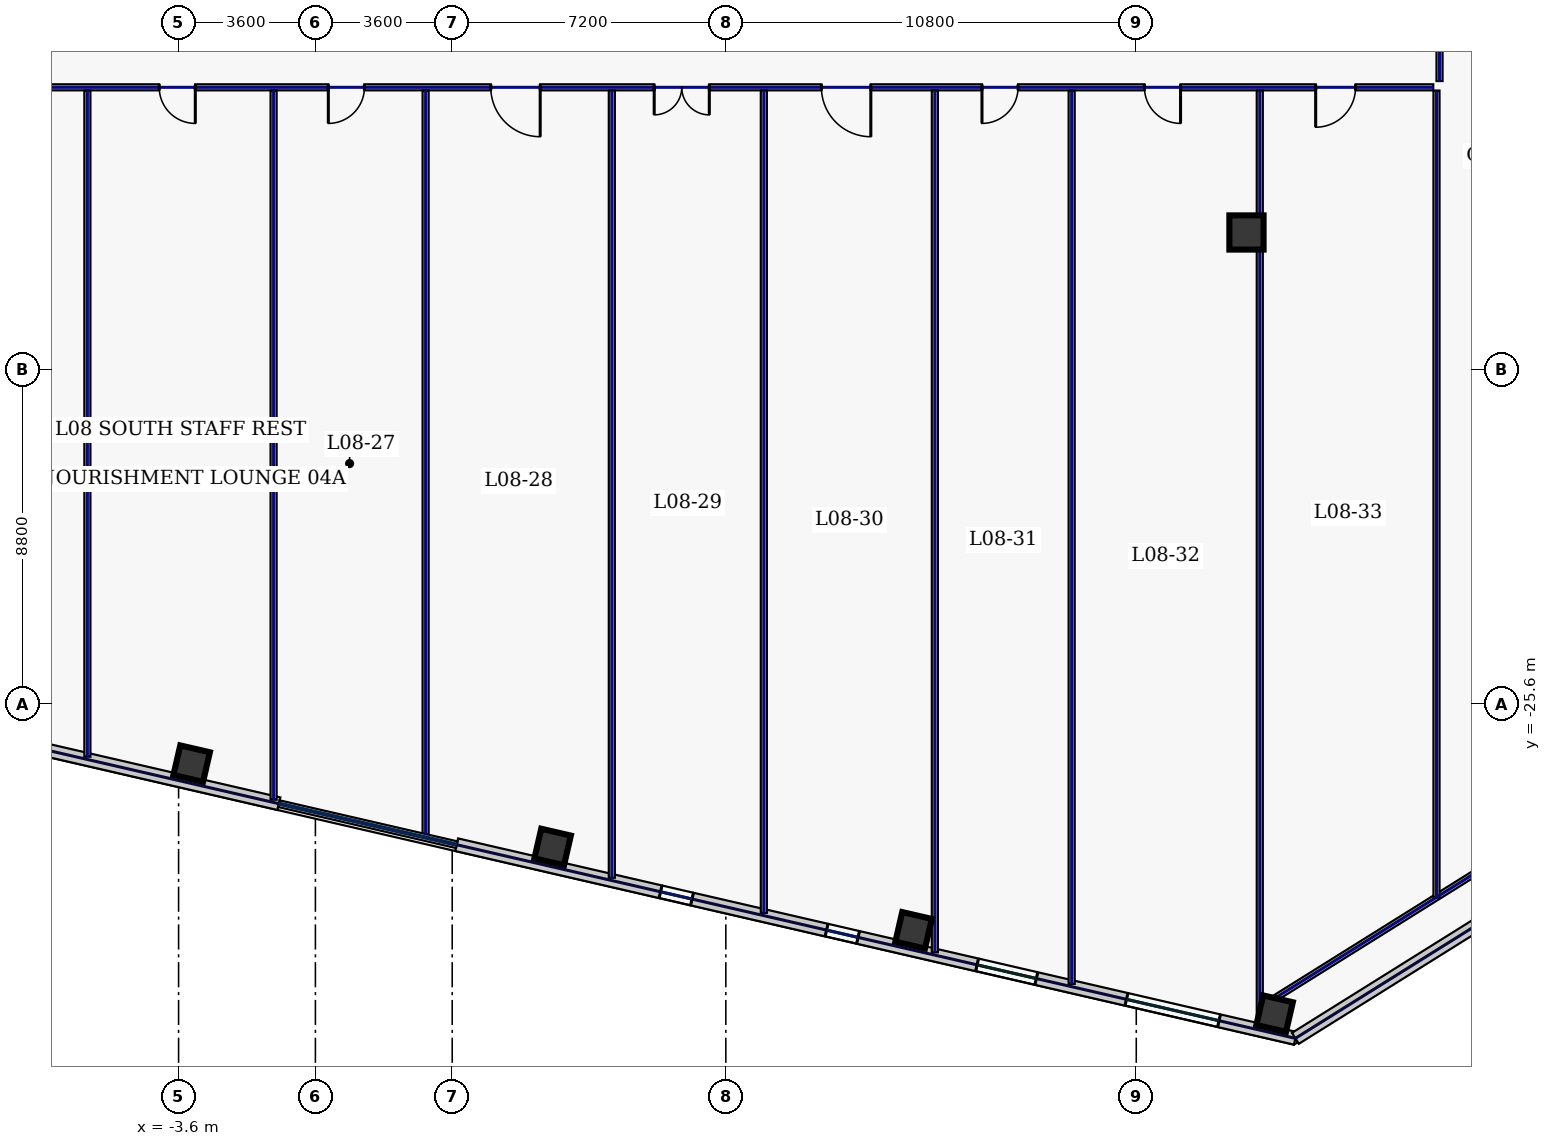
"""IFC4 building model, lengths in metres.
Left out: names, types, materials, properties, quantities, classifications, styles, units other than length and angle.
Written with IfcOpenShell. Run it as: python <this file> out.ifc"""

import sys

from ifc_helpers import new_model, si_unit, direction, frame, frame_2d, origin, origin_2d, place, context, subcontext, project, spatial, rectangle, hollow_rectangle, extrude, element, fill, save


model = new_model("IFC4")
c1 = context("Model", 3, precision=1e-05, world=origin(), true_north=direction((0.0, 1.0)))
c2 = subcontext(c1, "Body", "Model", "MODEL_VIEW")
j1 = project(units=[si_unit("LENGTHUNIT", "METRE"), si_unit("PLANEANGLEUNIT", "RADIAN")], contexts=[c1])
p1 = place(None, origin())
s1 = spatial("IfcSite", under=j1, at=p1, CompositionType="ELEMENT")
p2 = place(p1, origin())
s2 = spatial("IfcBuilding", under=s1, at=p2, CompositionType="ELEMENT")
p3 = place(p2, frame((0.0, 0.0, 43.4)))
s3 = spatial("IfcBuildingStorey", under=s2, at=p3, CompositionType="ELEMENT", Elevation=43.4)
p4 = place(p3, frame((24.5, -13.2, 0.0), z_axis=(0.0, 0.0, 1.0), x_axis=(1.0, 0.0, 0.0)))
e1 = element("IfcColumn", 1, at=p4, inside=s3, PredefinedType="COLUMN", context=c2, shape_type="SweptSolid", body=[
    extrude(hollow_rectangle(XDim=0.9, YDim=0.9, WallThickness=0.04, at=origin_2d()), origin(), (0.0, 0.0, 1.0), 3.74),
])
for number, where, z_axis, x_axis in (
    (2, (-3.256, -27.178, 0.0), (0.0, 0.0, 1.0), (0.974, -0.225, 0.0)),
    (3, (6.242, -29.371, 0.0), (0.0, 0.0, 1.0), (0.974, -0.225, 0.0)),
    (4, (15.741, -31.564, 0.0), (0.0, 0.0, 1.0), (0.974, -0.225, 0.0)),
    (5, (25.24, -33.757, 0.0), (0.0, 0.0, 1.0), (0.974, -0.225, 0.0)),
):
    element("IfcColumn", number, at=place(p3, frame(where, z_axis=z_axis, x_axis=x_axis)), inside=s3, PredefinedType="COLUMN", context=c2, shape_type="SweptSolid", body=[
        extrude(hollow_rectangle(XDim=0.8, YDim=0.8, WallThickness=0.036, at=origin_2d()), origin(), (0.0, 0.0, 1.0), 3.74),
    ])
p5 = place(p3, frame((-14.892, -25.015, 0.0), z_axis=(0.0, 0.0, 1.0), x_axis=(0.974372775, -0.224939314791, 0.0)))
e6 = element("IfcWall", 6, at=p5, inside=s3, PredefinedType="STANDARD", context=c2, shape_type="SweptSolid", body=[
    extrude(rectangle(XDim=14.299, YDim=0.34, at=frame_2d((7.149, 0.0))), origin(), (0.0, 0.0, 1.0), 3.74),
])
p6 = place(p5, frame((3.458, 0.0, 0.72)))
e7 = element("IfcOpeningElement", 7, at=p6, cuts=e6, PredefinedType="OPENING", context=c2, shape_type="SweptSolid", body=[
    extrude(rectangle(XDim=2.5, YDim=2.15, at=frame_2d((1.25, 1.075))), frame((0.0, 0.18, 0.0), z_axis=(0.0, -1.0, 0.0), x_axis=(1.0, 0.0, 0.0)), (0.0, 0.0, 1.0), 0.36),
])
p7 = place(p3, frame((3.717, -29.311, 0.0), z_axis=(0.0, 0.0, 1.0), x_axis=(0.97436993772, -0.224951604723, 0.0)))
e8 = element("IfcWall", 8, at=p7, inside=s3, PredefinedType="STANDARD", context=c2, shape_type="SweptSolid", body=[
    extrude(rectangle(XDim=22.651, YDim=0.34, at=frame_2d((11.326, 0.0))), origin(), (0.0, 0.0, 1.0), 3.74),
])
p8 = place(p7, frame((5.506, 0.0, 0.72)))
e9 = element("IfcOpeningElement", 9, at=p8, cuts=e8, PredefinedType="OPENING", context=c2, shape_type="SweptSolid", body=[
    extrude(rectangle(XDim=0.85, YDim=1.85, at=frame_2d((0.425, 0.925))), frame((0.0, 0.18, 0.0), z_axis=(0.0, -1.0, 0.0), x_axis=(1.0, 0.0, 0.0)), (0.0, 0.0, 1.0), 0.36),
])
p9 = place(p7, frame((9.991, 0.0, 0.72)))
e10 = element("IfcOpeningElement", 10, at=p9, cuts=e8, PredefinedType="OPENING", context=c2, shape_type="SweptSolid", body=[
    extrude(rectangle(XDim=0.85, YDim=1.85, at=frame_2d((0.425, 0.925))), frame((0.0, 0.18, 0.0), z_axis=(0.0, -1.0, 0.0), x_axis=(1.0, 0.0, 0.0)), (0.0, 0.0, 1.0), 0.36),
])
p10 = place(p7, frame((14.055, 0.0, 0.22)))
e11 = element("IfcOpeningElement", 11, at=p10, cuts=e8, PredefinedType="OPENING", context=c2, shape_type="SweptSolid", body=[
    extrude(rectangle(XDim=1.6, YDim=1.2, at=frame_2d((0.8, 0.6))), frame((0.0, 0.18, 0.0), z_axis=(0.0, -1.0, 0.0), x_axis=(1.0, 0.0, 0.0)), (0.0, 0.0, 1.0), 0.36),
])
p11 = place(p7, frame((18.089, 0.0, 0.72)))
e12 = element("IfcOpeningElement", 12, at=p11, cuts=e8, PredefinedType="OPENING", context=c2, shape_type="SweptSolid", body=[
    extrude(rectangle(XDim=2.5, YDim=2.15, at=frame_2d((1.25, 1.075))), frame((0.0, 0.18, 0.0), z_axis=(0.0, -1.0, 0.0), x_axis=(1.0, 0.0, 0.0)), (0.0, 0.0, 1.0), 0.36),
])
p12 = place(p3, frame((25.788, -34.406, 0.0), z_axis=(0.0, 0.0, 1.0), x_axis=(0.848046504656, 0.529921811158, 0.0)))
e13 = element("IfcWall", 13, at=p12, inside=s3, PredefinedType="STANDARD", context=c2, shape_type="SweptSolid", body=[
    extrude(rectangle(XDim=7.113, YDim=0.34, at=frame_2d((3.557, 0.0))), origin(), (0.0, 0.0, 1.0), 3.74),
])
p13 = place(p3, frame((25.06, -33.468, 0.0), z_axis=(0.0, 0.0, 1.0), x_axis=(0.848043064089, 0.529927317139, 0.0)))
e14 = element("IfcWall", 14, at=p13, inside=s3, PredefinedType="PARTITIONING", context=c2, shape_type="SweptSolid", body=[
    extrude(rectangle(XDim=7.354, YDim=0.16, at=frame_2d((3.677, 0.0))), origin(), (0.0, 0.0, 1.0), 3.74),
])
p14 = place(p3, frame((29.58, 9.415, 0.0), z_axis=(0.0, 0.0, 1.0), x_axis=(0.0, -1.0, 0.0)))
e15 = element("IfcWall", 15, at=p14, inside=s3, PredefinedType="PARTITIONING", context=c2, shape_type="SweptSolid", body=[
    extrude(rectangle(XDim=18.63, YDim=0.16, at=frame_2d((9.315, 0.0))), origin(), (0.0, 0.0, 1.0), 3.74),
])
p15 = place(p14, frame((16.081, 0.0, 0.0)))
e16 = element("IfcOpeningElement", 16, at=p15, cuts=e15, PredefinedType="OPENING", context=c2, shape_type="SweptSolid", body=[
    extrude(rectangle(XDim=0.95, YDim=2.2, at=frame_2d((0.475, 1.1))), frame((0.0, 0.09, 0.0), z_axis=(0.0, -1.0, 0.0), x_axis=(1.0, 0.0, 0.0)), (0.0, 0.0, 1.0), 0.18),
])
p16 = place(p14, frame((11.0, 0.0, 0.0)))
e17 = element("IfcOpeningElement", 17, at=p16, cuts=e15, PredefinedType="OPENING", context=c2, shape_type="SweptSolid", body=[
    extrude(rectangle(XDim=0.95, YDim=2.2, at=frame_2d((0.475, 1.1))), frame((0.0, 0.09, 0.0), z_axis=(0.0, -1.0, 0.0), x_axis=(1.0, 0.0, 0.0)), (0.0, 0.0, 1.0), 0.18),
])
p17 = place(p14, frame((5.8, 0.0, 0.0)))
e18 = element("IfcOpeningElement", 18, at=p17, cuts=e15, PredefinedType="OPENING", context=c2, shape_type="SweptSolid", body=[
    extrude(rectangle(XDim=0.95, YDim=2.2, at=frame_2d((0.475, 1.1))), frame((0.0, 0.09, 0.0), z_axis=(0.0, -1.0, 0.0), x_axis=(1.0, 0.0, 0.0)), (0.0, 0.0, 1.0), 0.18),
])
p18 = place(p14, frame((1.869, 0.0, 0.0)))
e19 = element("IfcOpeningElement", 19, at=p18, cuts=e15, PredefinedType="OPENING", context=c2, shape_type="SweptSolid", body=[
    extrude(rectangle(XDim=0.95, YDim=2.2, at=frame_2d((0.475, 1.1))), frame((0.0, 0.09, 0.0), z_axis=(0.0, -1.0, 0.0), x_axis=(1.0, 0.0, 0.0)), (0.0, 0.0, 1.0), 0.18),
])
p19 = place(p3, frame((29.415, -9.38, 0.0), z_axis=(0.0, 0.0, 1.0), x_axis=(-1.0, 0.0, 0.0)))
e20 = element("IfcWall", 20, at=p19, inside=s3, PredefinedType="PARTITIONING", context=c2, shape_type="SweptSolid", body=[
    extrude(rectangle(XDim=58.83, YDim=0.16, at=frame_2d((29.415, 0.0))), origin(), (0.0, 0.0, 1.0), 3.74),
])
p20 = place(p19, frame((55.831, 0.0, 0.0)))
e21 = element("IfcOpeningElement", 21, at=p20, cuts=e20, PredefinedType="OPENING", context=c2, shape_type="SweptSolid", body=[
    extrude(rectangle(XDim=1.3, YDim=2.2, at=frame_2d((0.65, 1.1))), frame((0.0, 0.09, 0.0), z_axis=(0.0, -1.0, 0.0), x_axis=(1.0, 0.0, 0.0)), (0.0, 0.0, 1.0), 0.18),
])
p21 = place(p19, frame((49.738, 0.0, 0.0)))
e22 = element("IfcOpeningElement", 22, at=p21, cuts=e20, PredefinedType="OPENING", context=c2, shape_type="SweptSolid", body=[
    extrude(rectangle(XDim=1.05, YDim=2.2, at=frame_2d((0.525, 1.1))), frame((0.0, 0.09, 0.0), z_axis=(0.0, -1.0, 0.0), x_axis=(1.0, 0.0, 0.0)), (0.0, 0.0, 1.0), 0.18),
])
p22 = place(p19, frame((45.512, 0.0, 0.0)))
e23 = element("IfcOpeningElement", 23, at=p22, cuts=e20, PredefinedType="OPENING", context=c2, shape_type="SweptSolid", body=[
    extrude(rectangle(XDim=0.95, YDim=2.2, at=frame_2d((0.475, 1.1))), frame((0.0, 0.09, 0.0), z_axis=(0.0, -1.0, 0.0), x_axis=(1.0, 0.0, 0.0)), (0.0, 0.0, 1.0), 0.18),
])
p23 = place(p19, frame((38.665, 0.0, 0.0)))
e24 = element("IfcOpeningElement", 24, at=p23, cuts=e20, PredefinedType="OPENING", context=c2, shape_type="SweptSolid", body=[
    extrude(rectangle(XDim=0.95, YDim=2.2, at=frame_2d((0.475, 1.1))), frame((0.0, 0.09, 0.0), z_axis=(0.0, -1.0, 0.0), x_axis=(1.0, 0.0, 0.0)), (0.0, 0.0, 1.0), 0.18),
])
p24 = place(p19, frame((32.575, 0.0, 0.0)))
e25 = element("IfcOpeningElement", 25, at=p24, cuts=e20, PredefinedType="OPENING", context=c2, shape_type="SweptSolid", body=[
    extrude(rectangle(XDim=0.95, YDim=2.2, at=frame_2d((0.475, 1.1))), frame((0.0, 0.09, 0.0), z_axis=(0.0, -1.0, 0.0), x_axis=(1.0, 0.0, 0.0)), (0.0, 0.0, 1.0), 0.18),
])
p25 = place(p19, frame((28.125, 0.0, 0.0)))
e26 = element("IfcOpeningElement", 26, at=p25, cuts=e20, PredefinedType="OPENING", context=c2, shape_type="SweptSolid", body=[
    extrude(rectangle(XDim=0.95, YDim=2.2, at=frame_2d((0.475, 1.1))), frame((0.0, 0.09, 0.0), z_axis=(0.0, -1.0, 0.0), x_axis=(1.0, 0.0, 0.0)), (0.0, 0.0, 1.0), 0.18),
])
p26 = place(p19, frame((23.5, 0.0, 0.0)))
e27 = element("IfcOpeningElement", 27, at=p26, cuts=e20, PredefinedType="OPENING", context=c2, shape_type="SweptSolid", body=[
    extrude(rectangle(XDim=1.3, YDim=2.2, at=frame_2d((0.65, 1.1))), frame((0.0, 0.09, 0.0), z_axis=(0.0, -1.0, 0.0), x_axis=(1.0, 0.0, 0.0)), (0.0, 0.0, 1.0), 0.18),
])
p27 = place(p19, frame((19.05, 0.0, 0.0)))
e28 = element("IfcOpeningElement", 28, at=p27, cuts=e20, PredefinedType="OPENING", context=c2, shape_type="SweptSolid", body=[
    extrude(rectangle(XDim=1.45, YDim=2.2, at=frame_2d((0.725, 1.1))), frame((0.0, 0.09, 0.0), z_axis=(0.0, -1.0, 0.0), x_axis=(1.0, 0.0, 0.0)), (0.0, 0.0, 1.0), 0.18),
])
p28 = place(p19, frame((14.8, 0.0, 0.0)))
e29 = element("IfcOpeningElement", 29, at=p28, cuts=e20, PredefinedType="OPENING", context=c2, shape_type="SweptSolid", body=[
    extrude(rectangle(XDim=1.3, YDim=2.2, at=frame_2d((0.65, 1.1))), frame((0.0, 0.09, 0.0), z_axis=(0.0, -1.0, 0.0), x_axis=(1.0, 0.0, 0.0)), (0.0, 0.0, 1.0), 0.18),
])
p29 = place(p19, frame((10.925, 0.0, 0.0)))
e30 = element("IfcOpeningElement", 30, at=p29, cuts=e20, PredefinedType="OPENING", context=c2, shape_type="SweptSolid", body=[
    extrude(rectangle(XDim=0.95, YDim=2.2, at=frame_2d((0.475, 1.1))), frame((0.0, 0.09, 0.0), z_axis=(0.0, -1.0, 0.0), x_axis=(1.0, 0.0, 0.0)), (0.0, 0.0, 1.0), 0.18),
])
p30 = place(p19, frame((6.65, 0.0, 0.0)))
e31 = element("IfcOpeningElement", 31, at=p30, cuts=e20, PredefinedType="OPENING", context=c2, shape_type="SweptSolid", body=[
    extrude(rectangle(XDim=0.95, YDim=2.2, at=frame_2d((0.475, 1.1))), frame((0.0, 0.09, 0.0), z_axis=(0.0, -1.0, 0.0), x_axis=(1.0, 0.0, 0.0)), (0.0, 0.0, 1.0), 0.18),
])
p31 = place(p19, frame((2.044, 0.0, 0.0)))
e32 = element("IfcOpeningElement", 32, at=p31, cuts=e20, PredefinedType="OPENING", context=c2, shape_type="SweptSolid", body=[
    extrude(rectangle(XDim=1.05, YDim=2.2, at=frame_2d((0.525, 1.1))), frame((0.0, 0.09, 0.0), z_axis=(0.0, -1.0, 0.0), x_axis=(1.0, 0.0, 0.0)), (0.0, 0.0, 1.0), 0.18),
])
p32 = place(p3, frame((29.5, -30.703, 0.0), z_axis=(0.0, 0.0, 1.0), x_axis=(0.0, 1.0, 0.0)))
e33 = element("IfcWall", 33, at=p32, inside=s3, PredefinedType="PARTITIONING", context=c2, shape_type="SweptSolid", body=[
    extrude(rectangle(XDim=21.238, YDim=0.16, at=frame_2d((10.619, 0.0))), origin(), (0.0, 0.0, 1.0), 3.74),
])
p33 = place(p3, frame((-6.0, -26.996, 0.0), z_axis=(0.0, 0.0, 1.0), x_axis=(0.0, 1.0, 0.0)))
e34 = element("IfcWall", 34, at=p33, inside=s3, PredefinedType="PARTITIONING", context=c2, shape_type="SweptSolid", body=[
    extrude(rectangle(XDim=17.531, YDim=0.16, at=frame_2d((8.765, 0.0))), origin(), (0.0, 0.0, 1.0), 3.74),
])
p34 = place(p3, frame((2.9, -29.051, 0.0), z_axis=(0.0, 0.0, 1.0), x_axis=(0.0, 1.0, 0.0)))
e35 = element("IfcWall", 35, at=p34, inside=s3, PredefinedType="PARTITIONING", context=c2, shape_type="SweptSolid", body=[
    extrude(rectangle(XDim=19.586, YDim=0.16, at=frame_2d((9.793, 0.0))), origin(), (0.0, 0.0, 1.0), 3.74),
])
p35 = place(p3, frame((11.8, -31.105, 0.0), z_axis=(0.0, 0.0, 1.0), x_axis=(0.0, 1.0, 0.0)))
e36 = element("IfcWall", 36, at=p35, inside=s3, PredefinedType="PARTITIONING", context=c2, shape_type="SweptSolid", body=[
    extrude(rectangle(XDim=21.64, YDim=0.16, at=frame_2d((10.82, 0.0))), origin(), (0.0, 0.0, 1.0), 3.74),
])
p36 = place(p3, frame((19.9, -32.975, 0.0), z_axis=(0.0, 0.0, 1.0), x_axis=(0.0, 1.0, 0.0)))
e37 = element("IfcWall", 37, at=p36, inside=s3, PredefinedType="PARTITIONING", context=c2, shape_type="SweptSolid", body=[
    extrude(rectangle(XDim=23.51, YDim=0.16, at=frame_2d((11.755, 0.0))), origin(), (0.0, 0.0, 1.0), 3.74),
])
p37 = place(p3, frame((24.85, -34.118, 0.0), z_axis=(0.0, 0.0, 1.0), x_axis=(0.0, 1.0, 0.0)))
e38 = element("IfcWall", 38, at=p37, inside=s3, PredefinedType="PARTITIONING", context=c2, shape_type="SweptSolid", body=[
    extrude(rectangle(XDim=24.653, YDim=0.16, at=frame_2d((12.327, 0.0))), origin(), (0.0, 0.0, 1.0), 3.235),
])
p38 = place(p3, frame((-1.1, -28.127, 0.0), z_axis=(0.0, 0.0, 1.0), x_axis=(0.0, 1.0, 0.0)))
e39 = element("IfcWall", 39, at=p38, inside=s3, PredefinedType="PARTITIONING", context=c2, shape_type="SweptSolid", body=[
    extrude(rectangle(XDim=18.662, YDim=0.16, at=frame_2d((9.331, 0.0))), origin(), (0.0, 0.0, 1.0), 3.74),
])
p39 = place(p3, frame((7.8, -30.182, 0.0), z_axis=(0.0, 0.0, 1.0), x_axis=(0.0, 1.0, 0.0)))
e40 = element("IfcWall", 40, at=p39, inside=s3, PredefinedType="PARTITIONING", context=c2, shape_type="SweptSolid", body=[
    extrude(rectangle(XDim=20.717, YDim=0.16, at=frame_2d((10.358, 0.0))), origin(), (0.0, 0.0, 1.0), 3.74),
])
p40 = place(p3, frame((16.3, -32.144, 0.0), z_axis=(0.0, 0.0, 1.0), x_axis=(0.0, 1.0, 0.0)))
e41 = element("IfcWall", 41, at=p40, inside=s3, PredefinedType="PARTITIONING", context=c2, shape_type="SweptSolid", body=[
    extrude(rectangle(XDim=22.679, YDim=0.16, at=frame_2d((11.34, 0.0))), origin(), (0.0, 0.0, 1.0), 3.74),
])
p41 = place(p8, origin())
e42 = element("IfcWindow", 42, at=p41, inside=s3, PartitioningType="SINGLE_PANEL", PredefinedType="WINDOW", context=c2, shape_type="SweptSolid", body=[
    extrude(rectangle(XDim=0.85, YDim=1.85, at=frame_2d((0.425, 0.925))), frame((0.0, 0.03, 0.0), z_axis=(0.0, -1.0, 0.0), x_axis=(1.0, 0.0, 0.0)), (0.0, 0.0, 1.0), 0.06),
])
fill(e9, e42)
p42 = place(p9, origin())
e43 = element("IfcWindow", 43, at=p42, inside=s3, PartitioningType="SINGLE_PANEL", PredefinedType="WINDOW", context=c2, shape_type="SweptSolid", body=[
    extrude(rectangle(XDim=0.85, YDim=1.85, at=frame_2d((0.425, 0.925))), frame((0.0, 0.03, 0.0), z_axis=(0.0, -1.0, 0.0), x_axis=(1.0, 0.0, 0.0)), (0.0, 0.0, 1.0), 0.06),
])
fill(e10, e43)
p43 = place(p10, origin())
e44 = element("IfcWindow", 44, at=p43, inside=s3, PartitioningType="SINGLE_PANEL", PredefinedType="WINDOW", context=c2, shape_type="SweptSolid", body=[
    extrude(rectangle(XDim=1.6, YDim=1.2, at=frame_2d((0.8, 0.6))), frame((0.0, 0.03, 0.0), z_axis=(0.0, -1.0, 0.0), x_axis=(1.0, 0.0, 0.0)), (0.0, 0.0, 1.0), 0.06),
])
fill(e11, e44)
p44 = place(p11, origin())
e45 = element("IfcWindow", 45, at=p44, inside=s3, PartitioningType="SINGLE_PANEL", PredefinedType="WINDOW", context=c2, shape_type="SweptSolid", body=[
    extrude(rectangle(XDim=2.5, YDim=2.15, at=frame_2d((1.25, 1.075))), frame((0.0, 0.03, 0.0), z_axis=(0.0, -1.0, 0.0), x_axis=(1.0, 0.0, 0.0)), (0.0, 0.0, 1.0), 0.06),
])
fill(e12, e45)
p45 = place(p24, origin())
e46 = element("IfcDoor", 46, at=p45, inside=s3, OperationType="SINGLE_SWING_LEFT", PredefinedType="DOOR", context=c2, shape_type="SweptSolid", body=[
    extrude(rectangle(XDim=0.95, YDim=2.2, at=frame_2d((0.475, 1.1))), frame((0.0, 0.025, 0.0), z_axis=(0.0, -1.0, 0.0), x_axis=(1.0, 0.0, 0.0)), (0.0, 0.0, 1.0), 0.05),
])
fill(e25, e46)
p46 = place(p25, origin())
e47 = element("IfcDoor", 47, at=p46, inside=s3, OperationType="SINGLE_SWING_RIGHT", PredefinedType="DOOR", context=c2, shape_type="SweptSolid", body=[
    extrude(rectangle(XDim=0.95, YDim=2.2, at=frame_2d((0.475, 1.1))), frame((0.0, 0.025, 0.0), z_axis=(0.0, -1.0, 0.0), x_axis=(1.0, 0.0, 0.0)), (0.0, 0.0, 1.0), 0.05),
])
fill(e26, e47)
p47 = place(p26, origin())
e48 = element("IfcDoor", 48, at=p47, inside=s3, OperationType="SINGLE_SWING_LEFT", PredefinedType="DOOR", context=c2, shape_type="SweptSolid", body=[
    extrude(rectangle(XDim=1.3, YDim=2.2, at=frame_2d((0.65, 1.1))), frame((0.0, 0.025, 0.0), z_axis=(0.0, -1.0, 0.0), x_axis=(1.0, 0.0, 0.0)), (0.0, 0.0, 1.0), 0.05),
])
fill(e27, e48)
p48 = place(p27, origin())
e49 = element("IfcDoor", 49, at=p48, inside=s3, OperationType="DOUBLE_SWING_LEFT", PredefinedType="DOOR", context=c2, shape_type="SweptSolid", body=[
    extrude(rectangle(XDim=1.45, YDim=2.2, at=frame_2d((0.725, 1.1))), frame((0.0, 0.025, 0.0), z_axis=(0.0, -1.0, 0.0), x_axis=(1.0, 0.0, 0.0)), (0.0, 0.0, 1.0), 0.05),
])
fill(e28, e49)
p49 = place(p28, origin())
e50 = element("IfcDoor", 50, at=p49, inside=s3, OperationType="SINGLE_SWING_LEFT", PredefinedType="DOOR", context=c2, shape_type="SweptSolid", body=[
    extrude(rectangle(XDim=1.3, YDim=2.2, at=frame_2d((0.65, 1.1))), frame((0.0, 0.025, 0.0), z_axis=(0.0, -1.0, 0.0), x_axis=(1.0, 0.0, 0.0)), (0.0, 0.0, 1.0), 0.05),
])
fill(e29, e50)
p50 = place(p29, origin())
e51 = element("IfcDoor", 51, at=p50, inside=s3, OperationType="SINGLE_SWING_RIGHT", PredefinedType="DOOR", context=c2, shape_type="SweptSolid", body=[
    extrude(rectangle(XDim=0.95, YDim=2.2, at=frame_2d((0.475, 1.1))), frame((0.0, 0.025, 0.0), z_axis=(0.0, -1.0, 0.0), x_axis=(1.0, 0.0, 0.0)), (0.0, 0.0, 1.0), 0.05),
])
fill(e30, e51)
p51 = place(p30, origin())
e52 = element("IfcDoor", 52, at=p51, inside=s3, OperationType="SINGLE_SWING_LEFT", PredefinedType="DOOR", context=c2, shape_type="SweptSolid", body=[
    extrude(rectangle(XDim=0.95, YDim=2.2, at=frame_2d((0.475, 1.1))), frame((0.0, 0.025, 0.0), z_axis=(0.0, -1.0, 0.0), x_axis=(1.0, 0.0, 0.0)), (0.0, 0.0, 1.0), 0.05),
])
fill(e31, e52)
p52 = place(p31, origin())
e53 = element("IfcDoor", 53, at=p52, inside=s3, OperationType="SINGLE_SWING_RIGHT", PredefinedType="DOOR", context=c2, shape_type="SweptSolid", body=[
    extrude(rectangle(XDim=1.05, YDim=2.2, at=frame_2d((0.525, 1.1))), frame((0.0, 0.025, 0.0), z_axis=(0.0, -1.0, 0.0), x_axis=(1.0, 0.0, 0.0)), (0.0, 0.0, 1.0), 0.05),
])
fill(e32, e53)
save(model, sys.argv[1])
